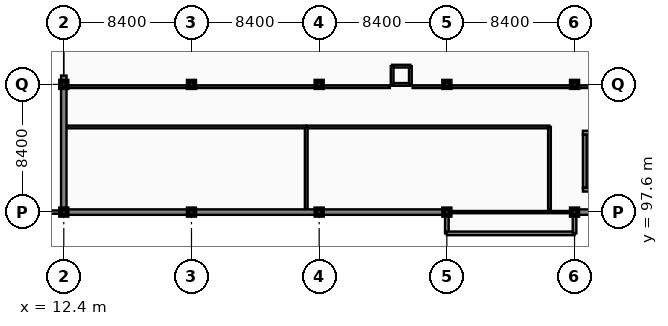
"""IFC4 building model, lengths in metres.
Left out: names, types, materials, properties, quantities, classifications, styles, units other than length and angle.
Written with IfcOpenShell. Run it as: python <this file> out.ifc"""

import sys

from ifc_helpers import new_model, si_unit, direction, frame, frame_2d, origin, origin_2d, place, context, subcontext, project, spatial, rectangle, extrude, element, fill, save


model = new_model("IFC4")
c1 = context("Model", 3, precision=1e-05, world=origin(), true_north=direction((0.0, 1.0)))
c2 = subcontext(c1, "Body", "Model", "MODEL_VIEW")
j1 = project(units=[si_unit("LENGTHUNIT", "METRE"), si_unit("PLANEANGLEUNIT", "RADIAN")], contexts=[c1])
p1 = place(None, origin())
s1 = spatial("IfcSite", under=j1, at=p1, CompositionType="ELEMENT")
p2 = place(p1, origin())
s2 = spatial("IfcBuilding", under=s1, at=p2, CompositionType="ELEMENT")
p3 = place(p2, frame((0.0, 0.0, 9.6)))
s3 = spatial("IfcBuildingStorey", under=s2, at=p3, CompositionType="ELEMENT", Elevation=9.6)
for number, where, z_axis, x_axis in (
    (1, (12.4, 97.6, 0.0), (0.0, 0.0, 1.0), (1.0, 0.0, 0.0)),
    (2, (12.4, 106.0, 0.0), (0.0, 0.0, 1.0), (1.0, 0.0, 0.0)),
    (3, (20.8, 97.6, 0.0), (0.0, 0.0, 1.0), (1.0, 0.0, 0.0)),
    (4, (20.8, 106.0, 0.0), (0.0, 0.0, 1.0), (1.0, 0.0, 0.0)),
    (5, (29.2, 97.6, 0.0), (0.0, 0.0, 1.0), (1.0, 0.0, 0.0)),
    (6, (29.2, 106.0, 0.0), (0.0, 0.0, 1.0), (1.0, 0.0, 0.0)),
    (7, (37.6, 97.6, 0.0), (0.0, 0.0, 1.0), (1.0, 0.0, 0.0)),
    (8, (37.6, 106.0, 0.0), (0.0, 0.0, 1.0), (1.0, 0.0, 0.0)),
    (9, (46.0, 97.6, 0.0), (0.0, 0.0, 1.0), (1.0, 0.0, 0.0)),
    (10, (46.0, 106.0, 0.0), (0.0, 0.0, 1.0), (1.0, 0.0, 0.0)),
):
    element("IfcColumn", number, at=place(p3, frame(where, z_axis=z_axis, x_axis=x_axis)), inside=s3, PredefinedType="COLUMN", context=c2, shape_type="SweptSolid", body=[
        extrude(rectangle(XDim=0.44, YDim=0.44, at=origin_2d()), origin(), (0.0, 0.0, 1.0), 4.2),
    ])
p4 = place(p3, frame((12.54, 103.2, 0.0), z_axis=(0.0, 0.0, 1.0), x_axis=(1.0, 0.0, 0.0)))
e11 = element("IfcWall", 11, at=p4, inside=s3, PredefinedType="PARTITIONING", context=c2, shape_type="SweptSolid", body=[
    extrude(rectangle(XDim=15.81, YDim=0.18, at=frame_2d((7.905, 0.0))), origin(), (0.0, 0.0, 1.0), 3.39),
])
p5 = place(p4, frame((7.405, 0.0, -0.01)))
e12 = element("IfcOpeningElement", 12, at=p5, cuts=e11, PredefinedType="OPENING", context=c2, shape_type="SweptSolid", body=[
    extrude(rectangle(XDim=1.0, YDim=2.16, at=frame_2d((0.5, 1.08))), frame((0.0, 0.1, 0.0), z_axis=(0.0, -1.0, 0.0), x_axis=(1.0, 0.0, 0.0)), (0.0, 0.0, 1.0), 0.2),
])
p6 = place(p3, frame((28.35, 103.2, 0.0), z_axis=(0.0, 0.0, 1.0), x_axis=(1.0, 0.0, 0.0)))
e13 = element("IfcWall", 13, at=p6, inside=s3, PredefinedType="PARTITIONING", context=c2, shape_type="SweptSolid", body=[
    extrude(rectangle(XDim=16.0, YDim=0.18, at=frame_2d((8.0, 0.0))), origin(), (0.0, 0.0, 1.0), 3.45),
])
p7 = place(p6, frame((7.5, 0.0, -0.01)))
e14 = element("IfcOpeningElement", 14, at=p7, cuts=e13, PredefinedType="OPENING", context=c2, shape_type="SweptSolid", body=[
    extrude(rectangle(XDim=1.0, YDim=2.16, at=frame_2d((0.5, 1.08))), frame((0.0, 0.1, 0.0), z_axis=(0.0, -1.0, 0.0), x_axis=(1.0, 0.0, 0.0)), (0.0, 0.0, 1.0), 0.2),
])
p8 = place(p3, frame((28.35, 97.74, 0.0), z_axis=(0.0, 0.0, 1.0), x_axis=(0.0, 1.0, 0.0)))
e15 = element("IfcWall", 15, at=p8, inside=s3, PredefinedType="PARTITIONING", context=c2, shape_type="SweptSolid", body=[
    extrude(rectangle(XDim=5.46, YDim=0.18, at=frame_2d((2.73, 0.0))), origin(), (0.0, 0.0, 1.0), 3.31),
])
p9 = place(p3, frame((44.35, 97.74, 0.0), z_axis=(0.0, 0.0, 1.0), x_axis=(0.0, 1.0, 0.0)))
e16 = element("IfcWall", 16, at=p9, inside=s3, PredefinedType="PARTITIONING", context=c2, shape_type="SweptSolid", body=[
    extrude(rectangle(XDim=5.46, YDim=0.18, at=frame_2d((2.73, 0.0))), origin(), (0.0, 0.0, 1.0), 3.61),
])
p10 = place(p3, frame((37.6, 97.6, 0.0), z_axis=(0.0, 0.0, 1.0), x_axis=(1.0, 0.0, 0.0)))
e17 = element("IfcWall", 17, at=p10, inside=s3, PredefinedType="PARTITIONING", context=c2, shape_type="SweptSolid", body=[
    extrude(rectangle(XDim=8.4, YDim=0.15, at=frame_2d((4.2, 0.0))), origin(), (0.0, 0.0, 1.0), 3.45),
])
p11 = place(p10, frame((2.59, 0.0, -0.01)))
e18 = element("IfcOpeningElement", 18, at=p11, cuts=e17, PredefinedType="OPENING", context=c2, shape_type="SweptSolid", body=[
    extrude(rectangle(XDim=1.0, YDim=2.16, at=frame_2d((0.5, 1.08))), frame((0.0, 0.085, 0.0), z_axis=(0.0, -1.0, 0.0), x_axis=(1.0, 0.0, 0.0)), (0.0, 0.0, 1.0), 0.17),
])
p12 = place(p3, frame((12.54, 105.85, 0.0), z_axis=(0.0, 0.0, 1.0), x_axis=(1.0, 0.0, 0.0)))
e19 = element("IfcWall", 19, at=p12, inside=s3, PredefinedType="PARTITIONING", context=c2, shape_type="SweptSolid", body=[
    extrude(rectangle(XDim=21.31, YDim=0.18, at=frame_2d((10.655, 0.0))), origin(), (0.0, 0.0, 1.0), 3.31),
])
p13 = place(p12, frame((8.87, 0.0, -0.01)))
e20 = element("IfcOpeningElement", 20, at=p13, cuts=e19, PredefinedType="OPENING", context=c2, shape_type="SweptSolid", body=[
    extrude(rectangle(XDim=1.6, YDim=2.21, at=frame_2d((0.8, 1.105))), frame((0.0, 0.1, 0.0), z_axis=(0.0, -1.0, 0.0), x_axis=(1.0, 0.0, 0.0)), (0.0, 0.0, 1.0), 0.2),
])
p14 = place(p3, frame((35.35, 105.85, 0.0), z_axis=(0.0, 0.0, 1.0), x_axis=(1.0, 0.0, 0.0)))
e21 = element("IfcWall", 21, at=p14, inside=s3, PredefinedType="PARTITIONING", context=c2, shape_type="SweptSolid", body=[
    extrude(rectangle(XDim=17.7, YDim=0.18, at=frame_2d((8.85, 0.0))), origin(), (0.0, 0.0, 1.0), 3.25),
])
p15 = place(p3, frame((12.4, 97.6, 0.0), z_axis=(0.0, 0.0, 1.0), x_axis=(1.0, 0.0, 0.0)))
e22 = element("IfcWall", 22, at=p15, inside=s3, PredefinedType="SOLIDWALL", context=c2, shape_type="SweptSolid", body=[
    extrude(rectangle(XDim=8.4, YDim=0.36, at=frame_2d((4.2, 0.0))), origin(), (0.0, 0.0, 1.0), 3.31),
])
p16 = place(p15, frame((0.46, 0.0, 0.75)))
e23 = element("IfcOpeningElement", 23, at=p16, cuts=e22, PredefinedType="OPENING", context=c2, shape_type="SweptSolid", body=[
    extrude(rectangle(XDim=1.55, YDim=2.4, at=frame_2d((0.775, 1.2))), frame((0.0, 0.19, 0.0), z_axis=(0.0, -1.0, 0.0), x_axis=(1.0, 0.0, 0.0)), (0.0, 0.0, 1.0), 0.38),
])
p17 = place(p15, frame((6.26, 0.0, 0.75)))
e24 = element("IfcOpeningElement", 24, at=p17, cuts=e22, PredefinedType="OPENING", context=c2, shape_type="SweptSolid", body=[
    extrude(rectangle(XDim=1.55, YDim=2.4, at=frame_2d((0.775, 1.2))), frame((0.0, 0.19, 0.0), z_axis=(0.0, -1.0, 0.0), x_axis=(1.0, 0.0, 0.0)), (0.0, 0.0, 1.0), 0.38),
])
p18 = place(p3, frame((20.8, 97.6, 0.0), z_axis=(0.0, 0.0, 1.0), x_axis=(1.0, 0.0, 0.0)))
e25 = element("IfcWall", 25, at=p18, inside=s3, PredefinedType="SOLIDWALL", context=c2, shape_type="SweptSolid", body=[
    extrude(rectangle(XDim=8.4, YDim=0.36, at=frame_2d((4.2, 0.0))), origin(), (0.0, 0.0, 1.0), 3.31),
])
p19 = place(p18, frame((0.46, 0.0, 0.75)))
e26 = element("IfcOpeningElement", 26, at=p19, cuts=e25, PredefinedType="OPENING", context=c2, shape_type="SweptSolid", body=[
    extrude(rectangle(XDim=1.55, YDim=2.4, at=frame_2d((0.775, 1.2))), frame((0.0, 0.19, 0.0), z_axis=(0.0, -1.0, 0.0), x_axis=(1.0, 0.0, 0.0)), (0.0, 0.0, 1.0), 0.38),
])
p20 = place(p18, frame((5.66, 0.0, 0.75)))
e27 = element("IfcOpeningElement", 27, at=p20, cuts=e25, PredefinedType="OPENING", context=c2, shape_type="SweptSolid", body=[
    extrude(rectangle(XDim=1.55, YDim=2.4, at=frame_2d((0.775, 1.2))), frame((0.0, 0.19, 0.0), z_axis=(0.0, -1.0, 0.0), x_axis=(1.0, 0.0, 0.0)), (0.0, 0.0, 1.0), 0.38),
])
p21 = place(p3, frame((29.2, 97.6, 0.0), z_axis=(0.0, 0.0, 1.0), x_axis=(1.0, 0.0, 0.0)))
e28 = element("IfcWall", 28, at=p21, inside=s3, PredefinedType="SOLIDWALL", context=c2, shape_type="SweptSolid", body=[
    extrude(rectangle(XDim=8.4, YDim=0.36, at=frame_2d((4.2, 0.0))), origin(), (0.0, 0.0, 1.0), 3.31),
])
p22 = place(p21, frame((0.46, 0.0, 0.75)))
e29 = element("IfcOpeningElement", 29, at=p22, cuts=e28, PredefinedType="OPENING", context=c2, shape_type="SweptSolid", body=[
    extrude(rectangle(XDim=1.55, YDim=2.4, at=frame_2d((0.775, 1.2))), frame((0.0, 0.19, 0.0), z_axis=(0.0, -1.0, 0.0), x_axis=(1.0, 0.0, 0.0)), (0.0, 0.0, 1.0), 0.38),
])
p23 = place(p21, frame((6.26, 0.0, 0.75)))
e30 = element("IfcOpeningElement", 30, at=p23, cuts=e28, PredefinedType="OPENING", context=c2, shape_type="SweptSolid", body=[
    extrude(rectangle(XDim=1.55, YDim=2.4, at=frame_2d((0.775, 1.2))), frame((0.0, 0.19, 0.0), z_axis=(0.0, -1.0, 0.0), x_axis=(1.0, 0.0, 0.0)), (0.0, 0.0, 1.0), 0.38),
])
p24 = place(p3, frame((46.0, 97.6, 0.0), z_axis=(0.0, 0.0, 1.0), x_axis=(1.0, 0.0, 0.0)))
e31 = element("IfcWall", 31, at=p24, inside=s3, PredefinedType="SOLIDWALL", context=c2, shape_type="SweptSolid", body=[
    extrude(rectangle(XDim=4.8, YDim=0.36, at=frame_2d((2.4, 0.0))), origin(), (0.0, 0.0, 1.0), 3.45),
])
p25 = place(p24, frame((0.46, 0.0, 0.75)))
e32 = element("IfcOpeningElement", 32, at=p25, cuts=e31, PredefinedType="OPENING", context=c2, shape_type="SweptSolid", body=[
    extrude(rectangle(XDim=1.55, YDim=2.4, at=frame_2d((0.775, 1.2))), frame((0.0, 0.19, 0.0), z_axis=(0.0, -1.0, 0.0), x_axis=(1.0, 0.0, 0.0)), (0.0, 0.0, 1.0), 0.38),
])
p26 = place(p24, frame((2.66, 0.0, 0.75)))
e33 = element("IfcOpeningElement", 33, at=p26, cuts=e31, PredefinedType="OPENING", context=c2, shape_type="SweptSolid", body=[
    extrude(rectangle(XDim=1.55, YDim=2.4, at=frame_2d((0.775, 1.2))), frame((0.0, 0.19, 0.0), z_axis=(0.0, -1.0, 0.0), x_axis=(1.0, 0.0, 0.0)), (0.0, 0.0, 1.0), 0.38),
])
p27 = place(p3, frame((12.4, 106.0, 0.0), z_axis=(0.0, 0.0, 1.0), x_axis=(0.0, -1.0, 0.0)))
e34 = element("IfcWall", 34, at=p27, inside=s3, PredefinedType="SOLIDWALL", context=c2, shape_type="SweptSolid", body=[
    extrude(rectangle(XDim=8.4, YDim=0.36, at=frame_2d((4.2, 0.0))), origin(), (0.0, 0.0, 1.0), 3.31),
])
p28 = place(p27, frame((0.46, 0.0, 0.75)))
e35 = element("IfcOpeningElement", 35, at=p28, cuts=e34, PredefinedType="OPENING", context=c2, shape_type="SweptSolid", body=[
    extrude(rectangle(XDim=1.55, YDim=2.4, at=frame_2d((0.775, 1.2))), frame((0.0, 0.19, 0.0), z_axis=(0.0, -1.0, 0.0), x_axis=(1.0, 0.0, 0.0)), (0.0, 0.0, 1.0), 0.38),
])
p29 = place(p27, frame((6.26, 0.0, 0.75)))
e36 = element("IfcOpeningElement", 36, at=p29, cuts=e34, PredefinedType="OPENING", context=c2, shape_type="SweptSolid", body=[
    extrude(rectangle(XDim=1.55, YDim=2.4, at=frame_2d((0.775, 1.2))), frame((0.0, 0.19, 0.0), z_axis=(0.0, -1.0, 0.0), x_axis=(1.0, 0.0, 0.0)), (0.0, 0.0, 1.0), 0.38),
])
p30 = place(p3, frame((12.4, 106.58, 0.0), z_axis=(0.0, 0.0, 1.0), x_axis=(0.0, -1.0, 0.0)))
e37 = element("IfcWall", 37, at=p30, inside=s3, PredefinedType="SOLIDWALL", context=c2, shape_type="SweptSolid", body=[
    extrude(rectangle(XDim=0.45, YDim=0.36, at=frame_2d((0.225, 0.0))), origin(), (0.0, 0.0, 1.0), 3.31),
])
p31 = place(p3, frame((37.6, 97.45, 0.0), z_axis=(0.0, 0.0, 1.0), x_axis=(0.0, -1.0, 0.0)))
e38 = element("IfcWall", 38, at=p31, inside=s3, PredefinedType="SOLIDWALL", context=c2, shape_type="SweptSolid", body=[
    extrude(rectangle(XDim=1.25, YDim=0.24, at=frame_2d((0.625, 0.0))), origin(), (0.0, 0.0, 1.0), 3.45),
])
p32 = place(p3, frame((37.6, 96.2, 0.0), z_axis=(0.0, 0.0, 1.0), x_axis=(1.0, 0.0, 0.0)))
e39 = element("IfcWall", 39, at=p32, inside=s3, PredefinedType="SOLIDWALL", context=c2, shape_type="SweptSolid", body=[
    extrude(rectangle(XDim=8.4, YDim=0.24, at=frame_2d((4.2, 0.0))), origin(), (0.0, 0.0, 1.0), 3.45),
])
p33 = place(p32, frame((0.46, 0.0, 0.65)))
e40 = element("IfcOpeningElement", 40, at=p33, cuts=e39, PredefinedType="OPENING", context=c2, shape_type="SweptSolid", body=[
    extrude(rectangle(XDim=2.4, YDim=2.2, at=frame_2d((1.2, 1.1))), frame((0.0, 0.13, 0.0), z_axis=(0.0, -1.0, 0.0), x_axis=(1.0, 0.0, 0.0)), (0.0, 0.0, 1.0), 0.26),
])
p34 = place(p32, frame((5.46, 0.0, 0.65)))
e41 = element("IfcOpeningElement", 41, at=p34, cuts=e39, PredefinedType="OPENING", context=c2, shape_type="SweptSolid", body=[
    extrude(rectangle(XDim=2.4, YDim=2.2, at=frame_2d((1.2, 1.1))), frame((0.0, 0.13, 0.0), z_axis=(0.0, -1.0, 0.0), x_axis=(1.0, 0.0, 0.0)), (0.0, 0.0, 1.0), 0.26),
])
p35 = place(p3, frame((46.0, 96.2, 0.0), z_axis=(0.0, 0.0, 1.0), x_axis=(0.0, 1.0, 0.0)))
e42 = element("IfcWall", 42, at=p35, inside=s3, PredefinedType="SOLIDWALL", context=c2, shape_type="SweptSolid", body=[
    extrude(rectangle(XDim=1.25, YDim=0.24, at=frame_2d((0.625, 0.0))), origin(), (0.0, 0.0, 1.0), 3.45),
])
p36 = place(p3, frame((4.0, 97.6, 0.0), z_axis=(0.0, 0.0, 1.0), x_axis=(1.0, 0.0, 0.0)))
e43 = element("IfcWall", 43, at=p36, inside=s3, PredefinedType="PARAPET", context=c2, shape_type="SweptSolid", body=[
    extrude(rectangle(XDim=8.4, YDim=0.22, at=frame_2d((4.2, 0.0))), origin(), (0.0, 0.0, 1.0), 1.15),
])
p37 = place(p3, frame((46.675, 102.7, 0.0), z_axis=(0.0, 0.0, 1.0), x_axis=(0.0, -1.0, 0.0)))
e44 = element("IfcWall", 44, at=p37, inside=s3, PredefinedType="SHEAR", context=c2, shape_type="SweptSolid", body=[
    extrude(rectangle(XDim=3.5, YDim=0.25, at=frame_2d((1.75, 0.0))), origin(), (0.0, 0.0, 1.0), 4.2),
])
p38 = place(p37, frame((1.1, 0.0, -0.01)))
e45 = element("IfcOpeningElement", 45, at=p38, cuts=e44, PredefinedType="OPENING", context=c2, shape_type="SweptSolid", body=[
    extrude(rectangle(XDim=1.3, YDim=2.16, at=frame_2d((0.65, 1.08))), frame((0.0, 0.135, 0.0), z_axis=(0.0, -1.0, 0.0), x_axis=(1.0, 0.0, 0.0)), (0.0, 0.0, 1.0), 0.27),
])
for number, where, z_axis, x_axis in (
    (46, (46.55, 99.075, 0.0), (0.0, 0.0, 1.0), (1.0, 0.0, 0.0)),
    (47, (46.55, 102.825, 0.0), (0.0, 0.0, 1.0), (1.0, 0.0, 0.0)),
):
    element("IfcWall", number, at=place(p3, frame(where, z_axis=z_axis, x_axis=x_axis)), inside=s3, PredefinedType="SHEAR", context=c2, shape_type="SweptSolid", body=[
        extrude(rectangle(XDim=8.9, YDim=0.25, at=frame_2d((4.45, 0.0))), origin(), (0.0, 0.0, 1.0), 4.2),
    ])
p39 = place(p3, frame((34.0, 106.0, 0.0), z_axis=(0.0, 0.0, 1.0), x_axis=(1.0, 0.0, 0.0)))
e48 = element("IfcWall", 48, at=p39, inside=s3, PredefinedType="SOLIDWALL", context=c2, shape_type="SweptSolid", body=[
    extrude(rectangle(XDim=1.2, YDim=0.18, at=frame_2d((0.6, 0.0))), origin(), (0.0, 0.0, 1.0), 3.97),
])
p40 = place(p39, frame((0.2, 0.0, -0.01)))
e49 = element("IfcOpeningElement", 49, at=p40, cuts=e48, PredefinedType="OPENING", context=c2, shape_type="SweptSolid", body=[
    extrude(rectangle(XDim=0.8, YDim=2.06, at=frame_2d((0.4, 1.03))), frame((0.0, 0.1, 0.0), z_axis=(0.0, -1.0, 0.0), x_axis=(1.0, 0.0, 0.0)), (0.0, 0.0, 1.0), 0.2),
])
for number, where, z_axis, x_axis in (
    (50, (35.2, 106.0, 0.0), (0.0, 0.0, 1.0), (0.0, 1.0, 0.0)),
    (51, (35.2, 107.2, 0.0), (0.0, 0.0, 1.0), (-1.0, 0.0, 0.0)),
    (52, (34.0, 107.2, 0.0), (0.0, 0.0, 1.0), (0.0, -1.0, 0.0)),
):
    element("IfcWall", number, at=place(p3, frame(where, z_axis=z_axis, x_axis=x_axis)), inside=s3, PredefinedType="SOLIDWALL", context=c2, shape_type="SweptSolid", body=[
        extrude(rectangle(XDim=1.2, YDim=0.18, at=frame_2d((0.6, 0.0))), origin(), (0.0, 0.0, 1.0), 3.97),
    ])
p41 = place(p5, frame((0.0, 0.0, 0.01)))
e53 = element("IfcDoor", 53, at=p41, inside=s3, OperationType="SINGLE_SWING_RIGHT", PredefinedType="DOOR", context=c2, shape_type="SweptSolid", body=[
    extrude(rectangle(XDim=1.0, YDim=2.15, at=frame_2d((0.5, 1.075))), frame((0.0, 0.025, 0.0), z_axis=(0.0, -1.0, 0.0), x_axis=(1.0, 0.0, 0.0)), (0.0, 0.0, 1.0), 0.05),
])
fill(e12, e53)
p42 = place(p7, frame((1.0, 0.0, 0.01), z_axis=(0.0, 0.0, 1.0), x_axis=(-1.0, 0.0, 0.0)))
e54 = element("IfcDoor", 54, at=p42, inside=s3, OperationType="SINGLE_SWING_LEFT", PredefinedType="DOOR", context=c2, shape_type="SweptSolid", body=[
    extrude(rectangle(XDim=1.0, YDim=2.15, at=frame_2d((0.5, 1.075))), frame((0.0, 0.025, 0.0), z_axis=(0.0, -1.0, 0.0), x_axis=(1.0, 0.0, 0.0)), (0.0, 0.0, 1.0), 0.05),
])
fill(e14, e54)
p43 = place(p11, frame((0.0, 0.0, 0.01)))
e55 = element("IfcDoor", 55, at=p43, inside=s3, OperationType="SINGLE_SWING_LEFT", PredefinedType="DOOR", context=c2, shape_type="SweptSolid", body=[
    extrude(rectangle(XDim=1.0, YDim=2.15, at=frame_2d((0.5, 1.075))), frame((0.0, 0.025, 0.0), z_axis=(0.0, -1.0, 0.0), x_axis=(1.0, 0.0, 0.0)), (0.0, 0.0, 1.0), 0.05),
])
fill(e18, e55)
p44 = place(p13, frame((0.0, 0.0, 0.01)))
e56 = element("IfcDoor", 56, at=p44, inside=s3, OperationType="DOUBLE_SWING_LEFT", PredefinedType="DOOR", context=c2, shape_type="SweptSolid", body=[
    extrude(rectangle(XDim=1.6, YDim=2.2, at=frame_2d((0.8, 1.1))), frame((0.0, 0.025, 0.0), z_axis=(0.0, -1.0, 0.0), x_axis=(1.0, 0.0, 0.0)), (0.0, 0.0, 1.0), 0.05),
])
fill(e20, e56)
p45 = place(p16, origin())
e57 = element("IfcWindow", 57, at=p45, inside=s3, PartitioningType="DOUBLE_PANEL_HORIZONTAL", PredefinedType="WINDOW", context=c2, shape_type="SweptSolid", body=[
    extrude(rectangle(XDim=1.55, YDim=2.4, at=frame_2d((0.775, 1.2))), frame((0.0, 0.03, 0.0), z_axis=(0.0, -1.0, 0.0), x_axis=(1.0, 0.0, 0.0)), (0.0, 0.0, 1.0), 0.06),
])
fill(e23, e57)
p46 = place(p17, origin())
e58 = element("IfcWindow", 58, at=p46, inside=s3, PartitioningType="DOUBLE_PANEL_HORIZONTAL", PredefinedType="WINDOW", context=c2, shape_type="SweptSolid", body=[
    extrude(rectangle(XDim=1.55, YDim=2.4, at=frame_2d((0.775, 1.2))), frame((0.0, 0.03, 0.0), z_axis=(0.0, -1.0, 0.0), x_axis=(1.0, 0.0, 0.0)), (0.0, 0.0, 1.0), 0.06),
])
fill(e24, e58)
p47 = place(p19, origin())
e59 = element("IfcWindow", 59, at=p47, inside=s3, PartitioningType="DOUBLE_PANEL_HORIZONTAL", PredefinedType="WINDOW", context=c2, shape_type="SweptSolid", body=[
    extrude(rectangle(XDim=1.55, YDim=2.4, at=frame_2d((0.775, 1.2))), frame((0.0, 0.03, 0.0), z_axis=(0.0, -1.0, 0.0), x_axis=(1.0, 0.0, 0.0)), (0.0, 0.0, 1.0), 0.06),
])
fill(e26, e59)
p48 = place(p20, origin())
e60 = element("IfcWindow", 60, at=p48, inside=s3, PartitioningType="DOUBLE_PANEL_HORIZONTAL", PredefinedType="WINDOW", context=c2, shape_type="SweptSolid", body=[
    extrude(rectangle(XDim=1.55, YDim=2.4, at=frame_2d((0.775, 1.2))), frame((0.0, 0.03, 0.0), z_axis=(0.0, -1.0, 0.0), x_axis=(1.0, 0.0, 0.0)), (0.0, 0.0, 1.0), 0.06),
])
fill(e27, e60)
p49 = place(p22, origin())
e61 = element("IfcWindow", 61, at=p49, inside=s3, PartitioningType="DOUBLE_PANEL_HORIZONTAL", PredefinedType="WINDOW", context=c2, shape_type="SweptSolid", body=[
    extrude(rectangle(XDim=1.55, YDim=2.4, at=frame_2d((0.775, 1.2))), frame((0.0, 0.03, 0.0), z_axis=(0.0, -1.0, 0.0), x_axis=(1.0, 0.0, 0.0)), (0.0, 0.0, 1.0), 0.06),
])
fill(e29, e61)
p50 = place(p23, origin())
e62 = element("IfcWindow", 62, at=p50, inside=s3, PartitioningType="DOUBLE_PANEL_HORIZONTAL", PredefinedType="WINDOW", context=c2, shape_type="SweptSolid", body=[
    extrude(rectangle(XDim=1.55, YDim=2.4, at=frame_2d((0.775, 1.2))), frame((0.0, 0.03, 0.0), z_axis=(0.0, -1.0, 0.0), x_axis=(1.0, 0.0, 0.0)), (0.0, 0.0, 1.0), 0.06),
])
fill(e30, e62)
p51 = place(p25, origin())
e63 = element("IfcWindow", 63, at=p51, inside=s3, PartitioningType="DOUBLE_PANEL_HORIZONTAL", PredefinedType="WINDOW", context=c2, shape_type="SweptSolid", body=[
    extrude(rectangle(XDim=1.55, YDim=2.4, at=frame_2d((0.775, 1.2))), frame((0.0, 0.03, 0.0), z_axis=(0.0, -1.0, 0.0), x_axis=(1.0, 0.0, 0.0)), (0.0, 0.0, 1.0), 0.06),
])
fill(e32, e63)
p52 = place(p28, origin())
e64 = element("IfcWindow", 64, at=p52, inside=s3, PartitioningType="DOUBLE_PANEL_HORIZONTAL", PredefinedType="WINDOW", context=c2, shape_type="SweptSolid", body=[
    extrude(rectangle(XDim=1.55, YDim=2.4, at=frame_2d((0.775, 1.2))), frame((0.0, 0.03, 0.0), z_axis=(0.0, -1.0, 0.0), x_axis=(1.0, 0.0, 0.0)), (0.0, 0.0, 1.0), 0.06),
])
fill(e35, e64)
p53 = place(p29, origin())
e65 = element("IfcWindow", 65, at=p53, inside=s3, PartitioningType="DOUBLE_PANEL_HORIZONTAL", PredefinedType="WINDOW", context=c2, shape_type="SweptSolid", body=[
    extrude(rectangle(XDim=1.55, YDim=2.4, at=frame_2d((0.775, 1.2))), frame((0.0, 0.03, 0.0), z_axis=(0.0, -1.0, 0.0), x_axis=(1.0, 0.0, 0.0)), (0.0, 0.0, 1.0), 0.06),
])
fill(e36, e65)
p54 = place(p33, origin())
e66 = element("IfcWindow", 66, at=p54, inside=s3, PartitioningType="TRIPLE_PANEL_VERTICAL", PredefinedType="WINDOW", context=c2, shape_type="SweptSolid", body=[
    extrude(rectangle(XDim=2.4, YDim=2.2, at=frame_2d((1.2, 1.1))), frame((0.0, 0.03, 0.0), z_axis=(0.0, -1.0, 0.0), x_axis=(1.0, 0.0, 0.0)), (0.0, 0.0, 1.0), 0.06),
])
fill(e40, e66)
p55 = place(p34, origin())
e67 = element("IfcWindow", 67, at=p55, inside=s3, PartitioningType="TRIPLE_PANEL_VERTICAL", PredefinedType="WINDOW", context=c2, shape_type="SweptSolid", body=[
    extrude(rectangle(XDim=2.4, YDim=2.2, at=frame_2d((1.2, 1.1))), frame((0.0, 0.03, 0.0), z_axis=(0.0, -1.0, 0.0), x_axis=(1.0, 0.0, 0.0)), (0.0, 0.0, 1.0), 0.06),
])
fill(e41, e67)
p56 = place(p38, frame((1.3, 0.0, 0.01), z_axis=(0.0, 0.0, 1.0), x_axis=(-1.0, 0.0, 0.0)))
e68 = element("IfcDoor", 68, at=p56, inside=s3, OperationType="SINGLE_SWING_LEFT", PredefinedType="DOOR", context=c2, shape_type="SweptSolid", body=[
    extrude(rectangle(XDim=1.3, YDim=2.15, at=frame_2d((0.65, 1.075))), frame((0.0, 0.025, 0.0), z_axis=(0.0, -1.0, 0.0), x_axis=(1.0, 0.0, 0.0)), (0.0, 0.0, 1.0), 0.05),
])
fill(e45, e68)
p57 = place(p40, frame((0.0, 0.0, 0.01)))
e69 = element("IfcDoor", 69, at=p57, inside=s3, OperationType="SINGLE_SWING_LEFT", PredefinedType="DOOR", context=c2, shape_type="SweptSolid", body=[
    extrude(rectangle(XDim=0.8, YDim=2.05, at=frame_2d((0.4, 1.025))), frame((0.0, 0.025, 0.0), z_axis=(0.0, -1.0, 0.0), x_axis=(1.0, 0.0, 0.0)), (0.0, 0.0, 1.0), 0.05),
])
fill(e49, e69)
save(model, sys.argv[1])
